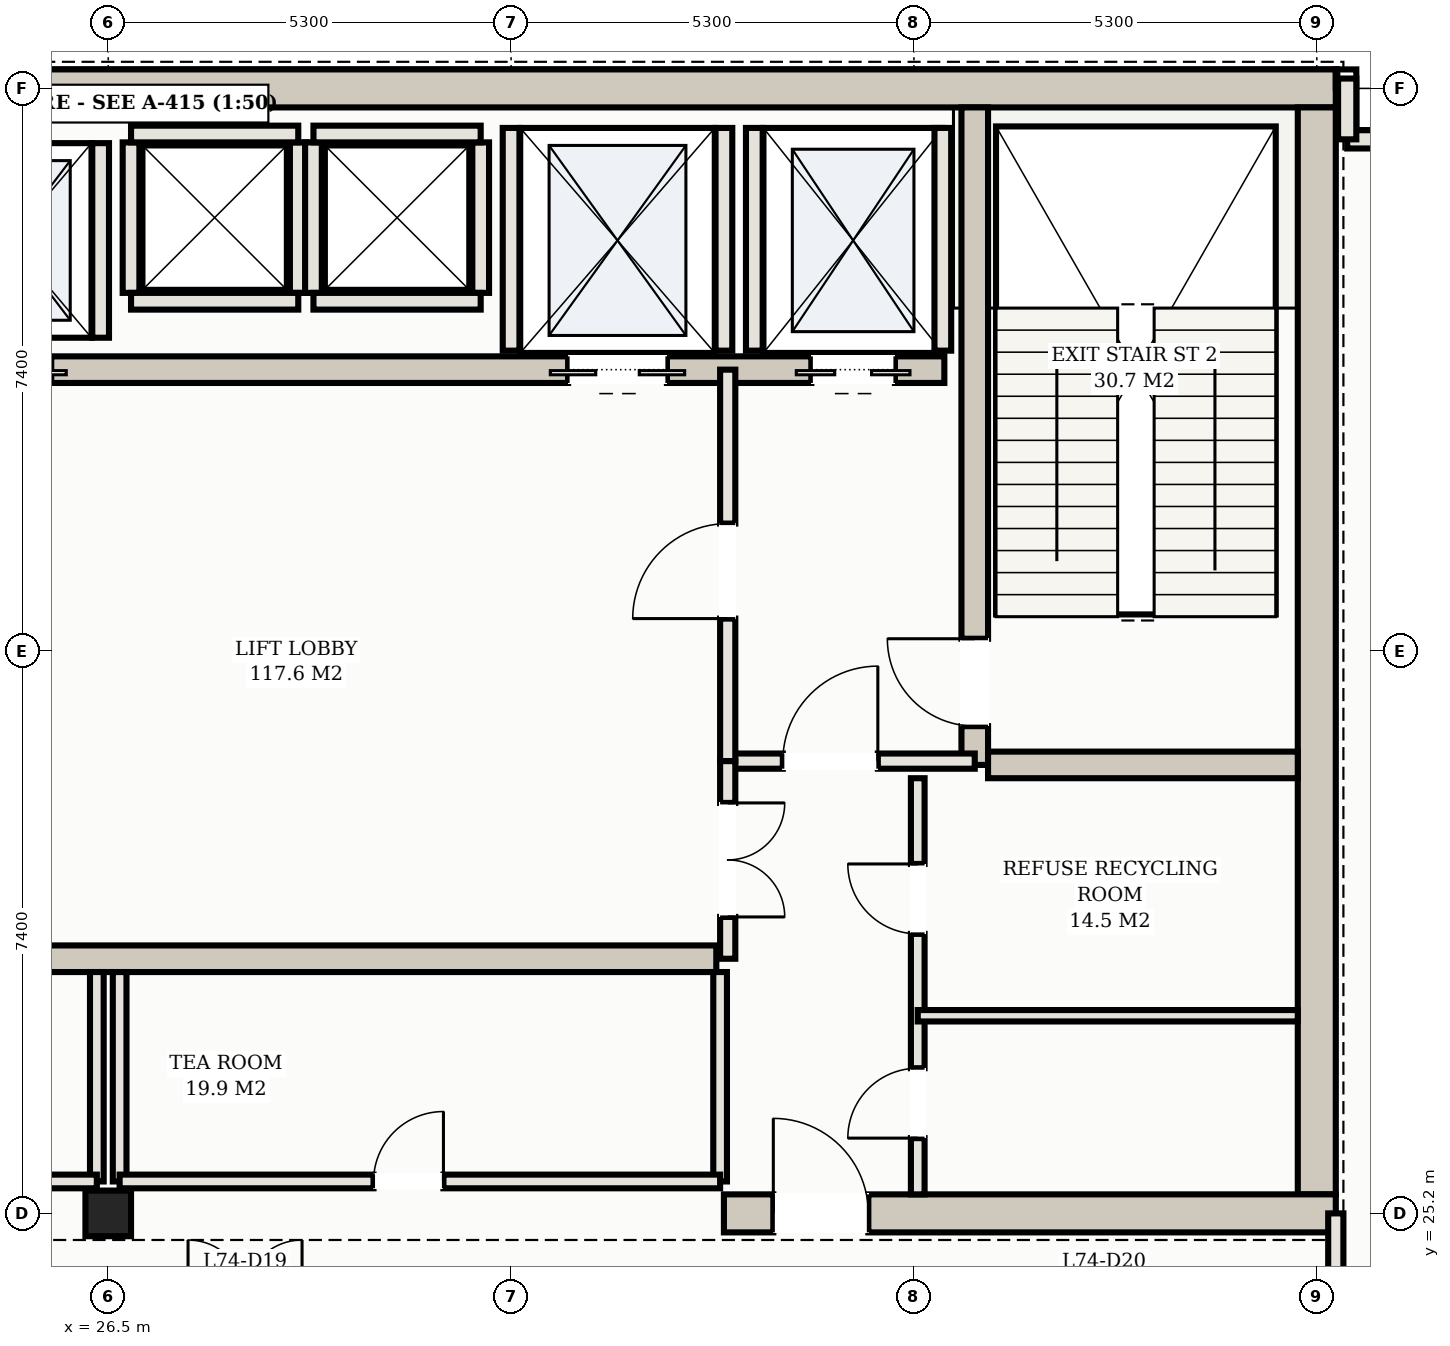
"""IFC4 building model, lengths in metres.
Left out: names, types, materials, properties, quantities, classifications, styles, units other than length and angle.
Written with IfcOpenShell. Run it as: python <this file> out.ifc"""

import sys

from ifc_helpers import new_model, si_unit, direction, frame, frame_2d, origin, origin_2d, place, context, subcontext, project, spatial, rectangle, hollow_rectangle, extrude, element, fill, save


model = new_model("IFC4")
c1 = context("Model", 3, precision=1e-05, world=origin(), true_north=direction((0.0, 1.0)))
c2 = subcontext(c1, "Body", "Model", "MODEL_VIEW")
j1 = project(units=[si_unit("LENGTHUNIT", "METRE"), si_unit("PLANEANGLEUNIT", "RADIAN")], contexts=[c1])
p1 = place(None, origin())
s1 = spatial("IfcSite", under=j1, at=p1, CompositionType="ELEMENT")
p2 = place(p1, origin())
s2 = spatial("IfcBuilding", under=s1, at=p2, CompositionType="ELEMENT")
p3 = place(p2, frame((0.0, 0.0, 266.0)))
s3 = spatial("IfcBuildingStorey", under=s2, at=p3, CompositionType="ELEMENT", Elevation=266.0)
p4 = place(p3, frame((10.35, 40.0, 0.0), z_axis=(0.0, 0.0, 1.0), x_axis=(1.0, 0.0, 0.0)))
e1 = element("IfcWall", 1, at=p4, inside=s3, PredefinedType="SHEAR", context=c2, shape_type="SweptSolid", body=[
    extrude(rectangle(XDim=32.3, YDim=0.5, at=frame_2d((16.15, 0.0))), origin(), (0.0, 0.0, 1.0), 4.52),
])
p5 = place(p3, frame((42.4, 25.45, 0.0), z_axis=(0.0, 0.0, 1.0), x_axis=(0.0, 1.0, 0.0)))
e2 = element("IfcWall", 2, at=p5, inside=s3, PredefinedType="SHEAR", context=c2, shape_type="SweptSolid", body=[
    extrude(rectangle(XDim=14.3, YDim=0.5, at=frame_2d((7.15, 0.0))), origin(), (0.0, 0.0, 1.0), 4.52),
])
p6 = place(p3, frame((34.6, 25.2, 0.0), z_axis=(0.0, 0.0, 1.0), x_axis=(1.0, 0.0, 0.0)))
e3 = element("IfcWall", 3, at=p6, inside=s3, PredefinedType="SHEAR", context=c2, shape_type="SweptSolid", body=[
    extrude(rectangle(XDim=8.05, YDim=0.5, at=frame_2d((4.025, 0.0))), origin(), (0.0, 0.0, 1.0), 4.52),
])
p7 = place(p6, frame((0.65, 0.0, 0.0)))
e4 = element("IfcOpeningElement", 4, at=p7, cuts=e3, PredefinedType="OPENING", context=c2, shape_type="SweptSolid", body=[
    extrude(rectangle(XDim=1.25, YDim=2.2, at=frame_2d((0.625, 1.1))), frame((0.0, 0.26, 0.0), z_axis=(0.0, -1.0, 0.0), x_axis=(1.0, 0.0, 0.0)), (0.0, 0.0, 1.0), 0.52),
])
p8 = place(p3, frame((37.9, 31.1, 0.0), z_axis=(0.0, 0.0, 1.0), x_axis=(0.0, 1.0, 0.0)))
e5 = element("IfcWall", 5, at=p8, inside=s3, PredefinedType="SHEAR", context=c2, shape_type="SweptSolid", body=[
    extrude(rectangle(XDim=8.65, YDim=0.35, at=frame_2d((4.325, 0.0))), origin(), (0.0, 0.0, 1.0), 4.52),
])
p9 = place(p8, frame((0.51, 0.0, 0.0)))
e6 = element("IfcOpeningElement", 6, at=p9, cuts=e5, PredefinedType="OPENING", context=c2, shape_type="SweptSolid", body=[
    extrude(rectangle(XDim=1.15, YDim=2.2, at=frame_2d((0.575, 1.1))), frame((0.0, 0.185, 0.0), z_axis=(0.0, -1.0, 0.0), x_axis=(1.0, 0.0, 0.0)), (0.0, 0.0, 1.0), 0.37),
])
p10 = place(p3, frame((38.075, 31.1, 0.0), z_axis=(0.0, 0.0, 1.0), x_axis=(1.0, 0.0, 0.0)))
e7 = element("IfcWall", 7, at=p10, inside=s3, PredefinedType="SHEAR", context=c2, shape_type="SweptSolid", body=[
    extrude(rectangle(XDim=4.075, YDim=0.35, at=frame_2d((2.038, 0.0))), origin(), (0.0, 0.0, 1.0), 4.52),
])
p11 = place(p3, frame((15.5, 36.3, 0.0), z_axis=(0.0, 0.0, 1.0), x_axis=(1.0, 0.0, 0.0)))
e8 = element("IfcWall", 8, at=p11, inside=s3, PredefinedType="SHEAR", context=c2, shape_type="SweptSolid", body=[
    extrude(rectangle(XDim=22.0, YDim=0.35, at=frame_2d((11.0, 0.0))), origin(), (0.0, 0.0, 1.0), 4.52),
])
p12 = place(p11, frame((0.65, 0.0, 0.0)))
e9 = element("IfcOpeningElement", 9, at=p12, cuts=e8, PredefinedType="OPENING", context=c2, shape_type="SweptSolid", body=[
    extrude(rectangle(XDim=1.1, YDim=2.15, at=frame_2d((0.55, 1.075))), frame((0.0, 0.185, 0.0), z_axis=(0.0, -1.0, 0.0), x_axis=(1.0, 0.0, 0.0)), (0.0, 0.0, 1.0), 0.37),
])
p13 = place(p11, frame((20.25, 0.0, 0.0)))
e10 = element("IfcOpeningElement", 10, at=p13, cuts=e8, PredefinedType="OPENING", context=c2, shape_type="SweptSolid", body=[
    extrude(rectangle(XDim=1.1, YDim=2.15, at=frame_2d((0.55, 1.075))), frame((0.0, 0.185, 0.0), z_axis=(0.0, -1.0, 0.0), x_axis=(1.0, 0.0, 0.0)), (0.0, 0.0, 1.0), 0.37),
])
p14 = place(p11, frame((17.05, 0.0, 0.0)))
e11 = element("IfcOpeningElement", 11, at=p14, cuts=e8, PredefinedType="OPENING", context=c2, shape_type="SweptSolid", body=[
    extrude(rectangle(XDim=1.3, YDim=2.2, at=frame_2d((0.65, 1.1))), frame((0.0, 0.185, 0.0), z_axis=(0.0, -1.0, 0.0), x_axis=(1.0, 0.0, 0.0)), (0.0, 0.0, 1.0), 0.37),
])
p15 = place(p11, frame((3.95, 0.0, 0.0)))
e12 = element("IfcOpeningElement", 12, at=p15, cuts=e8, PredefinedType="OPENING", context=c2, shape_type="SweptSolid", body=[
    extrude(rectangle(XDim=1.1, YDim=2.15, at=frame_2d((0.55, 1.075))), frame((0.0, 0.185, 0.0), z_axis=(0.0, -1.0, 0.0), x_axis=(1.0, 0.0, 0.0)), (0.0, 0.0, 1.0), 0.37),
])
p16 = place(p11, frame((6.55, 0.0, 0.0)))
e13 = element("IfcOpeningElement", 13, at=p16, cuts=e8, PredefinedType="OPENING", context=c2, shape_type="SweptSolid", body=[
    extrude(rectangle(XDim=1.1, YDim=2.15, at=frame_2d((0.55, 1.075))), frame((0.0, 0.185, 0.0), z_axis=(0.0, -1.0, 0.0), x_axis=(1.0, 0.0, 0.0)), (0.0, 0.0, 1.0), 0.37),
])
p17 = place(p11, frame((9.15, 0.0, 0.0)))
e14 = element("IfcOpeningElement", 14, at=p17, cuts=e8, PredefinedType="OPENING", context=c2, shape_type="SweptSolid", body=[
    extrude(rectangle(XDim=1.1, YDim=2.15, at=frame_2d((0.55, 1.075))), frame((0.0, 0.185, 0.0), z_axis=(0.0, -1.0, 0.0), x_axis=(1.0, 0.0, 0.0)), (0.0, 0.0, 1.0), 0.37),
])
p18 = place(p3, frame((18.5, 28.55, 0.0), z_axis=(0.0, 0.0, 1.0), x_axis=(1.0, 0.0, 0.0)))
e15 = element("IfcWall", 15, at=p18, inside=s3, PredefinedType="SHEAR", context=c2, shape_type="SweptSolid", body=[
    extrude(rectangle(XDim=16.0, YDim=0.35, at=frame_2d((8.0, 0.0))), origin(), (0.0, 0.0, 1.0), 4.52),
])
p19 = place(p3, frame((26.5, 25.2, 0.0), z_axis=(0.0, 0.0, 1.0), x_axis=(1.0, 0.0, 0.0)))
e16 = element("IfcColumn", 16, at=p19, inside=s3, PredefinedType="COLUMN", context=c2, shape_type="SweptSolid", body=[
    extrude(hollow_rectangle(XDim=0.6, YDim=0.6, WallThickness=0.022, at=origin_2d()), origin(), (0.0, 0.0, 1.0), 4.8),
])
for number, where, z_axis, x_axis in (
    (17, (35.0, 36.55, 0.0), (0.0, 0.0, 1.0), (0.0, 1.0, 0.0)),
    (18, (37.48, 36.55, 0.0), (0.0, 0.0, 1.0), (0.0, 1.0, 0.0)),
    (19, (31.8, 36.55, 0.0), (0.0, 0.0, 1.0), (0.0, 1.0, 0.0)),
    (20, (34.6, 36.55, 0.0), (0.0, 0.0, 1.0), (0.0, 1.0, 0.0)),
):
    element("IfcWall", number, at=place(p3, frame(where, z_axis=z_axis, x_axis=x_axis)), inside=s3, PredefinedType="SOLIDWALL", context=c2, shape_type="SweptSolid", body=[
        extrude(rectangle(XDim=2.93, YDim=0.22, at=frame_2d((1.465, 0.0))), origin(), (0.0, 0.0, 1.0), 4.52),
    ])
p20 = place(p3, frame((26.4, 36.72, 0.0), z_axis=(0.0, 0.0, 1.0), x_axis=(0.0, 1.0, 0.0)))
e21 = element("IfcWall", 21, at=p20, inside=s3, PredefinedType="SOLIDWALL", context=c2, shape_type="SweptSolid", body=[
    extrude(rectangle(XDim=2.56, YDim=0.22, at=frame_2d((1.28, 0.0))), origin(), (0.0, 0.0, 1.0), 4.52),
])
for number, where, z_axis, x_axis in (
    (22, (26.8, 37.31, 0.0), (0.0, 0.0, 1.0), (0.0, 1.0, 0.0)),
    (23, (29.0, 37.31, 0.0), (0.0, 0.0, 1.0), (0.0, 1.0, 0.0)),
):
    element("IfcWall", number, at=place(p3, frame(where, z_axis=z_axis, x_axis=x_axis)), inside=s3, PredefinedType="SOLIDWALL", context=c2, shape_type="SweptSolid", body=[
        extrude(rectangle(XDim=1.98, YDim=0.22, at=frame_2d((0.99, 0.0))), origin(), (0.0, 0.0, 1.0), 4.52),
    ])
for number, where, z_axis, x_axis in (
    (24, (26.8, 39.4, 0.0), (0.0, 0.0, 1.0), (1.0, 0.0, 0.0)),
    (25, (26.8, 37.2, 0.0), (0.0, 0.0, 1.0), (1.0, 0.0, 0.0)),
):
    element("IfcWall", number, at=place(p3, frame(where, z_axis=z_axis, x_axis=x_axis)), inside=s3, PredefinedType="SOLIDWALL", context=c2, shape_type="SweptSolid", body=[
        extrude(rectangle(XDim=2.2, YDim=0.22, at=frame_2d((1.1, 0.0))), origin(), (0.0, 0.0, 1.0), 4.52),
    ])
for number, where, z_axis, x_axis in (
    (26, (29.2, 37.31, 0.0), (0.0, 0.0, 1.0), (0.0, 1.0, 0.0)),
    (27, (31.4, 37.31, 0.0), (0.0, 0.0, 1.0), (0.0, 1.0, 0.0)),
):
    element("IfcWall", number, at=place(p3, frame(where, z_axis=z_axis, x_axis=x_axis)), inside=s3, PredefinedType="SOLIDWALL", context=c2, shape_type="SweptSolid", body=[
        extrude(rectangle(XDim=1.98, YDim=0.22, at=frame_2d((0.99, 0.0))), origin(), (0.0, 0.0, 1.0), 4.52),
    ])
for number, where, z_axis, x_axis in (
    (28, (29.2, 39.4, 0.0), (0.0, 0.0, 1.0), (1.0, 0.0, 0.0)),
    (29, (29.2, 37.2, 0.0), (0.0, 0.0, 1.0), (1.0, 0.0, 0.0)),
):
    element("IfcWall", number, at=place(p3, frame(where, z_axis=z_axis, x_axis=x_axis)), inside=s3, PredefinedType="SOLIDWALL", context=c2, shape_type="SweptSolid", body=[
        extrude(rectangle(XDim=2.2, YDim=0.22, at=frame_2d((1.1, 0.0))), origin(), (0.0, 0.0, 1.0), 4.52),
    ])
p21 = place(p3, frame((42.67, 40.13, 0.0), z_axis=(0.0, 0.0, 1.0), x_axis=(-1.0, 0.0, 0.0)))
e30 = element("IfcWall", 30, at=p21, inside=s3, PredefinedType="SOLIDWALL", context=c2, shape_type="SweptSolid", body=[
    extrude(rectangle(XDim=0.02, YDim=0.24, at=frame_2d((0.01, 0.0))), origin(), (0.0, 0.0, 1.0), 4.52),
])
p22 = place(p3, frame((43.6, 39.33, 0.0), z_axis=(0.0, 0.0, 1.0), x_axis=(-1.0, 0.0, 0.0)))
e31 = element("IfcWall", 31, at=p22, inside=s3, PredefinedType="SOLIDWALL", context=c2, shape_type="SweptSolid", body=[
    extrude(rectangle(XDim=0.8, YDim=0.24, at=frame_2d((0.4, 0.0))), origin(), (0.0, 0.0, 1.0), 4.52),
])
p23 = place(p3, frame((42.8, 39.33, 0.0), z_axis=(0.0, 0.0, 1.0), x_axis=(0.0, 1.0, 0.0)))
e32 = element("IfcWall", 32, at=p23, inside=s3, PredefinedType="SOLIDWALL", context=c2, shape_type="SweptSolid", body=[
    extrude(rectangle(XDim=0.8, YDim=0.24, at=frame_2d((0.4, 0.0))), origin(), (0.0, 0.0, 1.0), 4.52),
])
p24 = place(p3, frame((34.65, 31.15, 0.0), z_axis=(0.0, 0.0, 1.0), x_axis=(1.0, 0.0, 0.0)))
e33 = element("IfcWall", 33, at=p24, inside=s3, PredefinedType="PARTITIONING", context=c2, shape_type="SweptSolid", body=[
    extrude(rectangle(XDim=3.25, YDim=0.2, at=frame_2d((1.625, 0.0))), origin(), (0.0, 0.0, 1.0), 4.52),
])
p25 = place(p24, frame((0.725, 0.0, 0.0)))
e34 = element("IfcOpeningElement", 34, at=p25, cuts=e33, PredefinedType="OPENING", context=c2, shape_type="SweptSolid", body=[
    extrude(rectangle(XDim=1.25, YDim=2.2, at=frame_2d((0.625, 1.1))), frame((0.0, 0.11, 0.0), z_axis=(0.0, -1.0, 0.0), x_axis=(1.0, 0.0, 0.0)), (0.0, 0.0, 1.0), 0.22),
])
p26 = place(p3, frame((34.65, 31.15, 0.0), z_axis=(0.0, 0.0, 1.0), x_axis=(0.0, 1.0, 0.0)))
e35 = element("IfcWall", 35, at=p26, inside=s3, PredefinedType="PARTITIONING", context=c2, shape_type="SweptSolid", body=[
    extrude(rectangle(XDim=5.15, YDim=0.2, at=frame_2d((2.575, 0.0))), origin(), (0.0, 0.0, 1.0), 4.52),
])
p27 = place(p26, frame((1.875, 0.0, 0.0)))
e36 = element("IfcOpeningElement", 36, at=p27, cuts=e35, PredefinedType="OPENING", context=c2, shape_type="SweptSolid", body=[
    extrude(rectangle(XDim=1.25, YDim=2.2, at=frame_2d((0.625, 1.1))), frame((0.0, 0.11, 0.0), z_axis=(0.0, -1.0, 0.0), x_axis=(1.0, 0.0, 0.0)), (0.0, 0.0, 1.0), 0.22),
])
p28 = place(p3, frame((37.15, 25.45, 0.0), z_axis=(0.0, 0.0, 1.0), x_axis=(0.0, 1.0, 0.0)))
e37 = element("IfcWall", 37, at=p28, inside=s3, PredefinedType="PARTITIONING", context=c2, shape_type="SweptSolid", body=[
    extrude(rectangle(XDim=5.475, YDim=0.18, at=frame_2d((2.738, 0.0))), origin(), (0.0, 0.0, 1.0), 3.865),
])
p29 = place(p28, frame((0.74, 0.0, 0.0)))
e38 = element("IfcOpeningElement", 38, at=p29, cuts=e37, PredefinedType="OPENING", context=c2, shape_type="SweptSolid", body=[
    extrude(rectangle(XDim=0.92, YDim=2.15, at=frame_2d((0.46, 1.075))), frame((0.0, 0.1, 0.0), z_axis=(0.0, -1.0, 0.0), x_axis=(1.0, 0.0, 0.0)), (0.0, 0.0, 1.0), 0.2),
])
p30 = place(p28, frame((3.427, 0.0, 0.0)))
e39 = element("IfcOpeningElement", 39, at=p30, cuts=e37, PredefinedType="OPENING", context=c2, shape_type="SweptSolid", body=[
    extrude(rectangle(XDim=0.92, YDim=2.15, at=frame_2d((0.46, 1.075))), frame((0.0, 0.1, 0.0), z_axis=(0.0, -1.0, 0.0), x_axis=(1.0, 0.0, 0.0)), (0.0, 0.0, 1.0), 0.2),
])
p31 = place(p3, frame((37.15, 27.8, 0.0), z_axis=(0.0, 0.0, 1.0), x_axis=(1.0, 0.0, 0.0)))
e40 = element("IfcWall", 40, at=p31, inside=s3, PredefinedType="PARTITIONING", context=c2, shape_type="SweptSolid", body=[
    extrude(rectangle(XDim=5.0, YDim=0.15, at=frame_2d((2.5, 0.0))), origin(), (0.0, 0.0, 1.0), 4.52),
])
p32 = place(p3, frame((34.65, 28.55, 0.0), z_axis=(0.0, 0.0, 1.0), x_axis=(0.0, 1.0, 0.0)))
e41 = element("IfcWall", 41, at=p32, inside=s3, PredefinedType="PARTITIONING", context=c2, shape_type="SweptSolid", body=[
    extrude(rectangle(XDim=2.6, YDim=0.2, at=frame_2d((1.3, 0.0))), origin(), (0.0, 0.0, 1.0), 4.52),
])
p33 = place(p32, frame((0.55, 0.0, 0.0)))
e42 = element("IfcOpeningElement", 42, at=p33, cuts=e41, PredefinedType="OPENING", context=c2, shape_type="SweptSolid", body=[
    extrude(rectangle(XDim=1.5, YDim=2.25, at=frame_2d((0.75, 1.125))), frame((0.0, 0.11, 0.0), z_axis=(0.0, -1.0, 0.0), x_axis=(1.0, 0.0, 0.0)), (0.0, 0.0, 1.0), 0.22),
])
p34 = place(p3, frame((26.35, 25.62, 0.0), z_axis=(0.0, 0.0, 1.0), x_axis=(0.0, 1.0, 0.0)))
e43 = element("IfcWall", 43, at=p34, inside=s3, PredefinedType="PARTITIONING", context=c2, shape_type="SweptSolid", body=[
    extrude(rectangle(XDim=2.755, YDim=0.18, at=frame_2d((1.377, 0.0))), origin(), (0.0, 0.0, 1.0), 4.52),
])
p35 = place(p3, frame((18.45, 25.62, 0.0), z_axis=(0.0, 0.0, 1.0), x_axis=(1.0, 0.0, 0.0)))
e44 = element("IfcWall", 44, at=p35, inside=s3, PredefinedType="PARTITIONING", context=c2, shape_type="SweptSolid", body=[
    extrude(rectangle(XDim=7.9, YDim=0.18, at=frame_2d((3.95, 0.0))), origin(), (0.0, 0.0, 1.0), 4.52),
])
p36 = place(p35, frame((3.34, 0.0, 0.0)))
e45 = element("IfcOpeningElement", 45, at=p36, cuts=e44, PredefinedType="OPENING", context=c2, shape_type="SweptSolid", body=[
    extrude(rectangle(XDim=0.92, YDim=2.15, at=frame_2d((0.46, 1.075))), frame((0.0, 0.1, 0.0), z_axis=(0.0, -1.0, 0.0), x_axis=(1.0, 0.0, 0.0)), (0.0, 0.0, 1.0), 0.2),
])
for number, where, z_axis, x_axis in (
    (46, (26.65, 25.62, 0.0), (0.0, 0.0, 1.0), (0.0, 1.0, 0.0)),
    (47, (34.55, 25.62, 0.0), (0.0, 0.0, 1.0), (0.0, 1.0, 0.0)),
):
    element("IfcWall", number, at=place(p3, frame(where, z_axis=z_axis, x_axis=x_axis)), inside=s3, PredefinedType="PARTITIONING", context=c2, shape_type="SweptSolid", body=[
        extrude(rectangle(XDim=2.755, YDim=0.18, at=frame_2d((1.377, 0.0))), origin(), (0.0, 0.0, 1.0), 4.52),
    ])
p37 = place(p3, frame((26.65, 25.62, 0.0), z_axis=(0.0, 0.0, 1.0), x_axis=(1.0, 0.0, 0.0)))
e48 = element("IfcWall", 48, at=p37, inside=s3, PredefinedType="PARTITIONING", context=c2, shape_type="SweptSolid", body=[
    extrude(rectangle(XDim=7.9, YDim=0.18, at=frame_2d((3.95, 0.0))), origin(), (0.0, 0.0, 1.0), 4.52),
])
p38 = place(p37, frame((3.34, 0.0, 0.0)))
e49 = element("IfcOpeningElement", 49, at=p38, cuts=e48, PredefinedType="OPENING", context=c2, shape_type="SweptSolid", body=[
    extrude(rectangle(XDim=0.92, YDim=2.15, at=frame_2d((0.46, 1.075))), frame((0.0, 0.1, 0.0), z_axis=(0.0, -1.0, 0.0), x_axis=(1.0, 0.0, 0.0)), (0.0, 0.0, 1.0), 0.2),
])
p39 = place(p3, frame((42.65, 24.1, 0.0), z_axis=(0.0, 0.0, 1.0), x_axis=(0.0, 1.0, 0.0)))
e50 = element("IfcWall", 50, at=p39, inside=s3, PredefinedType="PARTITIONING", context=c2, shape_type="SweptSolid", body=[
    extrude(rectangle(XDim=1.1, YDim=0.2, at=frame_2d((0.55, 0.0))), origin(), (0.0, 0.0, 1.0), 3.865),
])
p40 = place(p13, frame((1.1, 0.0, 0.0), z_axis=(0.0, 0.0, 1.0), x_axis=(-1.0, 0.0, 0.0)))
e51 = element("IfcDoor", 51, at=p40, inside=s3, OperationType="DOUBLE_DOOR_SLIDING", PredefinedType="DOOR", context=c2, shape_type="SweptSolid", body=[
    extrude(rectangle(XDim=1.1, YDim=2.15, at=frame_2d((0.55, 1.075))), frame((0.0, 0.025, 0.0), z_axis=(0.0, -1.0, 0.0), x_axis=(1.0, 0.0, 0.0)), (0.0, 0.0, 1.0), 0.05),
])
fill(e10, e51)
p41 = place(p14, frame((1.3, 0.0, 0.0), z_axis=(0.0, 0.0, 1.0), x_axis=(-1.0, 0.0, 0.0)))
e52 = element("IfcDoor", 52, at=p41, inside=s3, OperationType="DOUBLE_DOOR_SLIDING", PredefinedType="DOOR", context=c2, shape_type="SweptSolid", body=[
    extrude(rectangle(XDim=1.3, YDim=2.2, at=frame_2d((0.65, 1.1))), frame((0.0, 0.025, 0.0), z_axis=(0.0, -1.0, 0.0), x_axis=(1.0, 0.0, 0.0)), (0.0, 0.0, 1.0), 0.05),
])
fill(e11, e52)
p42 = place(p7, origin())
e53 = element("IfcDoor", 53, at=p42, inside=s3, OperationType="SINGLE_SWING_LEFT", PredefinedType="DOOR", context=c2, shape_type="SweptSolid", body=[
    extrude(rectangle(XDim=1.25, YDim=2.2, at=frame_2d((0.625, 1.1))), frame((0.0, 0.025, 0.0), z_axis=(0.0, -1.0, 0.0), x_axis=(1.0, 0.0, 0.0)), (0.0, 0.0, 1.0), 0.05),
])
fill(e4, e53)
p43 = place(p25, origin())
e54 = element("IfcDoor", 54, at=p43, inside=s3, OperationType="SINGLE_SWING_RIGHT", PredefinedType="DOOR", context=c2, shape_type="SweptSolid", body=[
    extrude(rectangle(XDim=1.25, YDim=2.2, at=frame_2d((0.625, 1.1))), frame((0.0, 0.025, 0.0), z_axis=(0.0, -1.0, 0.0), x_axis=(1.0, 0.0, 0.0)), (0.0, 0.0, 1.0), 0.05),
])
fill(e34, e54)
p44 = place(p27, origin())
e55 = element("IfcDoor", 55, at=p44, inside=s3, OperationType="SINGLE_SWING_LEFT", PredefinedType="DOOR", context=c2, shape_type="SweptSolid", body=[
    extrude(rectangle(XDim=1.25, YDim=2.2, at=frame_2d((0.625, 1.1))), frame((0.0, 0.025, 0.0), z_axis=(0.0, -1.0, 0.0), x_axis=(1.0, 0.0, 0.0)), (0.0, 0.0, 1.0), 0.05),
])
fill(e36, e55)
p45 = place(p9, origin())
e56 = element("IfcDoor", 56, at=p45, inside=s3, OperationType="SINGLE_SWING_RIGHT", PredefinedType="DOOR", context=c2, shape_type="SweptSolid", body=[
    extrude(rectangle(XDim=1.15, YDim=2.2, at=frame_2d((0.575, 1.1))), frame((0.0, 0.025, 0.0), z_axis=(0.0, -1.0, 0.0), x_axis=(1.0, 0.0, 0.0)), (0.0, 0.0, 1.0), 0.05),
])
fill(e6, e56)
p46 = place(p29, origin())
e57 = element("IfcDoor", 57, at=p46, inside=s3, OperationType="SINGLE_SWING_LEFT", PredefinedType="DOOR", context=c2, shape_type="SweptSolid", body=[
    extrude(rectangle(XDim=0.92, YDim=2.15, at=frame_2d((0.46, 1.075))), frame((0.0, 0.025, 0.0), z_axis=(0.0, -1.0, 0.0), x_axis=(1.0, 0.0, 0.0)), (0.0, 0.0, 1.0), 0.05),
])
fill(e38, e57)
p47 = place(p30, origin())
e58 = element("IfcDoor", 58, at=p47, inside=s3, OperationType="SINGLE_SWING_RIGHT", PredefinedType="DOOR", context=c2, shape_type="SweptSolid", body=[
    extrude(rectangle(XDim=0.92, YDim=2.15, at=frame_2d((0.46, 1.075))), frame((0.0, 0.025, 0.0), z_axis=(0.0, -1.0, 0.0), x_axis=(1.0, 0.0, 0.0)), (0.0, 0.0, 1.0), 0.05),
])
fill(e39, e58)
p48 = place(p33, frame((1.5, 0.0, 0.0), z_axis=(0.0, 0.0, 1.0), x_axis=(-1.0, 0.0, 0.0)))
e59 = element("IfcDoor", 59, at=p48, inside=s3, OperationType="DOUBLE_DOOR_SINGLE_SWING", PredefinedType="DOOR", context=c2, shape_type="SweptSolid", body=[
    extrude(rectangle(XDim=1.5, YDim=2.25, at=frame_2d((0.75, 1.125))), frame((0.0, 0.025, 0.0), z_axis=(0.0, -1.0, 0.0), x_axis=(1.0, 0.0, 0.0)), (0.0, 0.0, 1.0), 0.05),
])
fill(e42, e59)
p49 = place(p38, origin())
e60 = element("IfcDoor", 60, at=p49, inside=s3, OperationType="SINGLE_SWING_RIGHT", PredefinedType="DOOR", context=c2, shape_type="SweptSolid", body=[
    extrude(rectangle(XDim=0.92, YDim=2.15, at=frame_2d((0.46, 1.075))), frame((0.0, 0.025, 0.0), z_axis=(0.0, -1.0, 0.0), x_axis=(1.0, 0.0, 0.0)), (0.0, 0.0, 1.0), 0.05),
])
fill(e49, e60)
save(model, sys.argv[1])
